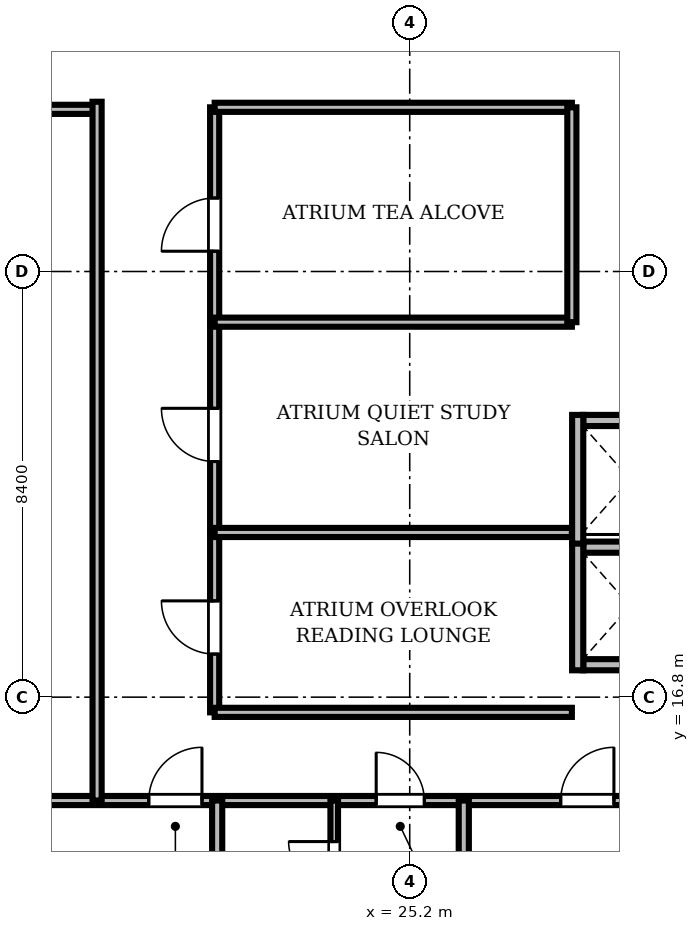
"""IFC4 building model, lengths in metres.
Left out: names, types, materials, properties, quantities, classifications, styles, units other than length and angle.
Written with IfcOpenShell. Run it as: python <this file> out.ifc"""

import sys

from ifc_helpers import new_model, si_unit, direction, frame, frame_2d, origin, place, context, subcontext, project, spatial, rectangle, extrude, source, transform, mapped, element, fill, save


model = new_model("IFC4")
c1 = context("Model", 3, precision=1e-05, world=origin(), true_north=direction((0.0, 1.0)))
c2 = subcontext(c1, "Body", "Model", "MODEL_VIEW")
j1 = project(units=[si_unit("LENGTHUNIT", "METRE"), si_unit("PLANEANGLEUNIT", "RADIAN")], contexts=[c1])
p1 = place(None, origin())
s1 = spatial("IfcSite", under=j1, at=p1, CompositionType="ELEMENT")
p2 = place(p1, origin())
s2 = spatial("IfcBuilding", under=s1, at=p2, CompositionType="ELEMENT")
p3 = place(p2, frame((0.0, 0.0, 45.85)))
s3 = spatial("IfcBuildingStorey", under=s2, at=p3, CompositionType="ELEMENT", Elevation=45.85)
m1 = source(origin(), c2, "Body", "SweptSolid", [
    extrude(rectangle(XDim=1.85, YDim=0.22, at=frame_2d((0.925, 0.0))), origin(), (0.0, 0.0, 1.0), 3.41),
])
for number, where, z_axis, x_axis in (
    (1, (28.625, 17.44, 0.0), (0.0, 0.0, 1.0), (1.0, 0.0, 0.0)),
    (2, (28.625, 19.76, 0.0), (0.0, 0.0, 1.0), (1.0, 0.0, 0.0)),
):
    element("IfcWall", number, at=place(p3, frame(where, z_axis=z_axis, x_axis=x_axis)), inside=s3, PredefinedType="SOLIDWALL", context=c2, shape_type="MappedRepresentation", body=[
        mapped(m1, transform((0.0, 0.0, 0.0), scale=1.0)),
    ])
m2 = source(origin(), c2, "Body", "SweptSolid", [
    extrude(rectangle(XDim=2.54, YDim=0.22, at=frame_2d((1.27, 0.0))), origin(), (0.0, 0.0, 1.0), 3.41),
])
p4 = place(p3, frame((28.515, 17.33, 0.0), z_axis=(0.0, 0.0, 1.0), x_axis=(0.0, 1.0, 0.0)))
e3 = element("IfcWall", 3, at=p4, inside=s3, PredefinedType="SOLIDWALL", context=c2, shape_type="MappedRepresentation", body=[
    mapped(m2, transform((0.0, 0.0, 0.0), scale=1.0)),
])
p5 = place(p3, frame((28.625, 22.26, 0.0), z_axis=(0.0, 0.0, 1.0), x_axis=(1.0, 0.0, 0.0)))
e4 = element("IfcWall", 4, at=p5, inside=s3, PredefinedType="SOLIDWALL", context=c2, shape_type="MappedRepresentation", body=[
    mapped(m1, transform((0.0, 0.0, 0.0), scale=1.0)),
])
p6 = place(p3, frame((28.515, 19.83, 0.0), z_axis=(0.0, 0.0, 1.0), x_axis=(0.0, 1.0, 0.0)))
e5 = element("IfcWall", 5, at=p6, inside=s3, PredefinedType="SOLIDWALL", context=c2, shape_type="MappedRepresentation", body=[
    mapped(m2, transform((0.0, 0.0, 0.0), scale=1.0)),
])
m3 = source(origin(), c2, "Body", "SweptSolid", [
    extrude(rectangle(XDim=46.156, YDim=0.18, at=frame_2d((23.078, 0.0))), origin(), (0.0, 0.0, 1.0), 2.652),
])
p7 = place(p3, frame((2.422, 14.76, 0.0), z_axis=(0.0, 0.0, 1.0), x_axis=(1.0, 0.0, 0.0)))
e6 = element("IfcWall", 6, at=p7, inside=s3, PredefinedType="PARTITIONING", context=c2, shape_type="MappedRepresentation", body=[
    mapped(m3, transform((0.0, 0.0, 0.0), scale=1.0)),
])
m4 = source(origin(), c2, "Body", "SweptSolid", [
    extrude(rectangle(XDim=1.05, YDim=2.2, at=frame_2d((0.525, 1.1))), frame((0.0, 0.1, 0.0), z_axis=(0.0, -1.0, 0.0), x_axis=(1.0, 0.0, 0.0)), (0.0, 0.0, 1.0), 0.2),
])
p8 = place(p7, frame((17.628, 0.0, 0.0)))
e7 = element("IfcOpeningElement", 7, at=p8, cuts=e6, PredefinedType="OPENING", context=c2, shape_type="MappedRepresentation", body=[
    mapped(m4, transform((0.0, 0.0, 0.0), scale=1.0)),
])
m5 = source(origin(), c2, "Body", "SweptSolid", [
    extrude(rectangle(XDim=0.95, YDim=2.15, at=frame_2d((0.475, 1.075))), frame((0.0, 0.1, 0.0), z_axis=(0.0, -1.0, 0.0), x_axis=(1.0, 0.0, 0.0)), (0.0, 0.0, 1.0), 0.2),
])
p9 = place(p7, frame((22.116, 0.0, 0.0)))
e8 = element("IfcOpeningElement", 8, at=p9, cuts=e6, PredefinedType="OPENING", context=c2, shape_type="MappedRepresentation", body=[
    mapped(m5, transform((0.0, 0.0, 0.0), scale=1.0)),
])
p10 = place(p7, frame((25.758, 0.0, 0.0)))
e9 = element("IfcOpeningElement", 9, at=p10, cuts=e6, PredefinedType="OPENING", context=c2, shape_type="MappedRepresentation", body=[
    mapped(m4, transform((0.0, 0.0, 0.0), scale=1.0)),
])
p11 = place(p7, frame((30.625, 0.0, 0.0)))
e10 = element("IfcOpeningElement", 10, at=p11, cuts=e6, PredefinedType="OPENING", context=c2, shape_type="MappedRepresentation", body=[
    mapped(m4, transform((0.0, 0.0, 0.0), scale=1.0)),
])
p12 = place(p7, frame((36.716, 0.0, 0.0)))
e11 = element("IfcOpeningElement", 11, at=p12, cuts=e6, PredefinedType="OPENING", context=c2, shape_type="MappedRepresentation", body=[
    mapped(m5, transform((0.0, 0.0, 0.0), scale=1.0)),
])
p13 = place(p7, frame((41.766, 0.0, 0.0)))
e12 = element("IfcOpeningElement", 12, at=p13, cuts=e6, PredefinedType="OPENING", context=c2, shape_type="MappedRepresentation", body=[
    mapped(m4, transform((0.0, 0.0, 0.0), scale=1.0)),
])
m6 = source(origin(), c2, "Body", "SweptSolid", [
    extrude(rectangle(XDim=4.24, YDim=0.18, at=frame_2d((2.12, 0.0))), origin(), (0.0, 0.0, 1.0), 2.802),
])
p14 = place(p3, frame((21.35, 24.2, 0.0), z_axis=(0.0, 0.0, 1.0), x_axis=(0.0, 1.0, 0.0)))
e13 = element("IfcWall", 13, at=p14, inside=s3, PredefinedType="PARTITIONING", context=c2, shape_type="MappedRepresentation", body=[
    mapped(m6, transform((0.0, 0.0, 0.0), scale=1.0)),
])
p15 = place(p14, frame((1.4, 0.0, 0.0)))
e14 = element("IfcOpeningElement", 14, at=p15, cuts=e13, PredefinedType="OPENING", context=c2, shape_type="MappedRepresentation", body=[
    mapped(m4, transform((0.0, 0.0, 0.0), scale=1.0)),
])
m7 = source(origin(), c2, "Body", "SweptSolid", [
    extrude(rectangle(XDim=4.15, YDim=0.18, at=frame_2d((2.075, 0.0))), origin(), (0.0, 0.0, 1.0), 3.042),
])
p16 = place(p3, frame((21.35, 20.05, 0.0), z_axis=(0.0, 0.0, 1.0), x_axis=(0.0, 1.0, 0.0)))
e15 = element("IfcWall", 15, at=p16, inside=s3, PredefinedType="PARTITIONING", context=c2, shape_type="MappedRepresentation", body=[
    mapped(m7, transform((0.0, 0.0, 0.0), scale=1.0)),
])
p17 = place(p16, frame((1.4, 0.0, 0.0)))
e16 = element("IfcOpeningElement", 16, at=p17, cuts=e15, PredefinedType="OPENING", context=c2, shape_type="MappedRepresentation", body=[
    mapped(m4, transform((0.0, 0.0, 0.0), scale=1.0)),
])
m8 = source(origin(), c2, "Body", "SweptSolid", [
    extrude(rectangle(XDim=3.55, YDim=0.18, at=frame_2d((1.775, 0.0))), origin(), (0.0, 0.0, 1.0), 2.802),
])
p18 = place(p3, frame((21.35, 16.5, 0.0), z_axis=(0.0, 0.0, 1.0), x_axis=(0.0, 1.0, 0.0)))
e17 = element("IfcWall", 17, at=p18, inside=s3, PredefinedType="PARTITIONING", context=c2, shape_type="MappedRepresentation", body=[
    mapped(m8, transform((0.0, 0.0, 0.0), scale=1.0)),
])
p19 = place(p18, frame((1.15, 0.0, 0.0)))
e18 = element("IfcOpeningElement", 18, at=p19, cuts=e17, PredefinedType="OPENING", context=c2, shape_type="MappedRepresentation", body=[
    mapped(m4, transform((0.0, 0.0, 0.0), scale=1.0)),
])
m9 = source(origin(), c2, "Body", "SweptSolid", [
    extrude(rectangle(XDim=2.36, YDim=0.15, at=frame_2d((1.18, 0.0))), origin(), (0.0, 0.0, 1.0), 3.41),
])
p20 = place(p3, frame((23.71, 12.4, 0.0), z_axis=(0.0, 0.0, 1.0), x_axis=(0.0, 1.0, 0.0)))
e19 = element("IfcWall", 19, at=p20, inside=s3, PredefinedType="PARTITIONING", context=c2, shape_type="MappedRepresentation", body=[
    mapped(m9, transform((0.0, 0.0, 0.0), scale=1.0)),
])
m10 = source(origin(), c2, "Body", "SweptSolid", [
    extrude(rectangle(XDim=0.9, YDim=2.1, at=frame_2d((0.45, 1.05))), frame((0.0, 0.085, 0.0), z_axis=(0.0, -1.0, 0.0), x_axis=(1.0, 0.0, 0.0)), (0.0, 0.0, 1.0), 0.17),
])
p21 = place(p20, frame((0.65, 0.0, 0.0)))
e20 = element("IfcOpeningElement", 20, at=p21, cuts=e19, PredefinedType="OPENING", context=c2, shape_type="MappedRepresentation", body=[
    mapped(m10, transform((0.0, 0.0, 0.0), scale=1.0)),
])
m11 = source(origin(), c2, "Body", "SweptSolid", [
    extrude(rectangle(XDim=16.8, YDim=0.18, at=frame_2d((8.4, 0.0))), origin(), (0.0, 0.0, 1.0), 2.652),
])
p22 = place(p3, frame((2.23, 28.4, 0.0), z_axis=(0.0, 0.0, 1.0), x_axis=(1.0, 0.0, 0.0)))
e21 = element("IfcWall", 21, at=p22, inside=s3, PredefinedType="PARTITIONING", context=c2, shape_type="MappedRepresentation", body=[
    mapped(m11, transform((0.0, 0.0, 0.0), scale=1.0)),
])
m12 = source(origin(), c2, "Body", "SweptSolid", [
    extrude(rectangle(XDim=13.79, YDim=0.18, at=frame_2d((6.895, 0.0))), origin(), (0.0, 0.0, 1.0), 2.802),
])
p23 = place(p3, frame((19.03, 14.76, 0.0), z_axis=(0.0, 0.0, 1.0), x_axis=(0.0, 1.0, 0.0)))
e22 = element("IfcWall", 22, at=p23, inside=s3, PredefinedType="PARTITIONING", context=c2, shape_type="MappedRepresentation", body=[
    mapped(m12, transform((0.0, 0.0, 0.0), scale=1.0)),
])
m13 = source(origin(), c2, "Body", "SweptSolid", [
    extrude(rectangle(XDim=12.638, YDim=0.2, at=frame_2d((6.319, 0.0))), origin(), (0.0, 0.0, 1.0), 2.652),
])
p24 = place(p3, frame((21.4, 2.122, 0.0), z_axis=(0.0, 0.0, 1.0), x_axis=(0.0, 1.0, 0.0)))
e23 = element("IfcWall", 23, at=p24, inside=s3, PredefinedType="PARTITIONING", context=c2, shape_type="MappedRepresentation", body=[
    mapped(m13, transform((0.0, 0.0, 0.0), scale=1.0)),
])
m14 = source(origin(), c2, "Body", "SweptSolid", [
    extrude(rectangle(XDim=12.83, YDim=0.2, at=frame_2d((6.415, 0.0))), origin(), (0.0, 0.0, 1.0), 2.652),
])
p25 = place(p3, frame((26.267, 1.93, 0.0), z_axis=(0.0, 0.0, 1.0), x_axis=(0.0, 1.0, 0.0)))
e24 = element("IfcWall", 24, at=p25, inside=s3, PredefinedType="PARTITIONING", context=c2, shape_type="MappedRepresentation", body=[
    mapped(m14, transform((0.0, 0.0, 0.0), scale=1.0)),
])
m15 = source(origin(), c2, "Body", "SweptSolid", [
    extrude(rectangle(XDim=7.05, YDim=0.18, at=frame_2d((3.525, 0.0))), origin(), (0.0, 0.0, 1.0), 2.802),
])
p26 = place(p3, frame((21.35, 16.5, 0.0), z_axis=(0.0, 0.0, 1.0), x_axis=(1.0, 0.0, 0.0)))
e25 = element("IfcWall", 25, at=p26, inside=s3, PredefinedType="PARTITIONING", context=c2, shape_type="MappedRepresentation", body=[
    mapped(m15, transform((0.0, 0.0, 0.0), scale=1.0)),
])
m16 = source(origin(), c2, "Body", "SweptSolid", [
    extrude(rectangle(XDim=7.05, YDim=0.18, at=frame_2d((3.525, 0.0))), origin(), (0.0, 0.0, 1.0), 3.41),
])
for number, where, z_axis, x_axis in (
    (26, (21.35, 20.05, 0.0), (0.0, 0.0, 1.0), (1.0, 0.0, 0.0)),
    (27, (21.35, 24.2, 0.0), (0.0, 0.0, 1.0), (1.0, 0.0, 0.0)),
    (28, (21.35, 28.44, 0.0), (0.0, 0.0, 1.0), (1.0, 0.0, 0.0)),
):
    element("IfcWall", number, at=place(p3, frame(where, z_axis=z_axis, x_axis=x_axis)), inside=s3, PredefinedType="PARTITIONING", context=c2, shape_type="MappedRepresentation", body=[
        mapped(m16, transform((0.0, 0.0, 0.0), scale=1.0)),
    ])
p27 = place(p3, frame((28.4, 24.2, 0.0), z_axis=(0.0, 0.0, 1.0), x_axis=(0.0, 1.0, 0.0)))
e29 = element("IfcWall", 29, at=p27, inside=s3, PredefinedType="PARTITIONING", context=c2, shape_type="MappedRepresentation", body=[
    mapped(m6, transform((0.0, 0.0, 0.0), scale=1.0)),
])
m17 = source(origin(), c2, "Body", "SweptSolid", [
    extrude(rectangle(XDim=1.05, YDim=2.2, at=frame_2d((0.525, 1.1))), frame((0.0, 0.025, 0.0), z_axis=(0.0, -1.0, 0.0), x_axis=(1.0, 0.0, 0.0)), (0.0, 0.0, 1.0), 0.05),
])
p28 = place(p8, origin())
e30 = element("IfcDoor", 30, at=p28, inside=s3, OperationType="SINGLE_SWING_RIGHT", PredefinedType="DOOR", context=c2, shape_type="MappedRepresentation", body=[
    mapped(m17, transform((0.0, 0.0, 0.0), scale=1.0)),
])
fill(e7, e30)
m18 = source(origin(), c2, "Body", "SweptSolid", [
    extrude(rectangle(XDim=0.95, YDim=2.15, at=frame_2d((0.475, 1.075))), frame((0.0, 0.025, 0.0), z_axis=(0.0, -1.0, 0.0), x_axis=(1.0, 0.0, 0.0)), (0.0, 0.0, 1.0), 0.05),
])
p29 = place(p9, origin())
e31 = element("IfcDoor", 31, at=p29, inside=s3, OperationType="SINGLE_SWING_LEFT", PredefinedType="DOOR", context=c2, shape_type="MappedRepresentation", body=[
    mapped(m18, transform((0.0, 0.0, 0.0), scale=1.0)),
])
fill(e8, e31)
p30 = place(p10, origin())
e32 = element("IfcDoor", 32, at=p30, inside=s3, OperationType="SINGLE_SWING_RIGHT", PredefinedType="DOOR", context=c2, shape_type="MappedRepresentation", body=[
    mapped(m17, transform((0.0, 0.0, 0.0), scale=1.0)),
])
fill(e9, e32)
p31 = place(p15, origin())
e33 = element("IfcDoor", 33, at=p31, inside=s3, OperationType="SINGLE_SWING_LEFT", PredefinedType="DOOR", context=c2, shape_type="MappedRepresentation", body=[
    mapped(m17, transform((0.0, 0.0, 0.0), scale=1.0)),
])
fill(e14, e33)
p32 = place(p17, origin())
e34 = element("IfcDoor", 34, at=p32, inside=s3, OperationType="SINGLE_SWING_RIGHT", PredefinedType="DOOR", context=c2, shape_type="MappedRepresentation", body=[
    mapped(m17, transform((0.0, 0.0, 0.0), scale=1.0)),
])
fill(e16, e34)
p33 = place(p19, origin())
e35 = element("IfcDoor", 35, at=p33, inside=s3, OperationType="SINGLE_SWING_RIGHT", PredefinedType="DOOR", context=c2, shape_type="MappedRepresentation", body=[
    mapped(m17, transform((0.0, 0.0, 0.0), scale=1.0)),
])
fill(e18, e35)
m19 = source(origin(), c2, "Body", "SweptSolid", [
    extrude(rectangle(XDim=0.9, YDim=2.1, at=frame_2d((0.45, 1.05))), frame((0.0, 0.025, 0.0), z_axis=(0.0, -1.0, 0.0), x_axis=(1.0, 0.0, 0.0)), (0.0, 0.0, 1.0), 0.05),
])
p34 = place(p21, origin())
e36 = element("IfcDoor", 36, at=p34, inside=s3, OperationType="SINGLE_SWING_RIGHT", PredefinedType="DOOR", context=c2, shape_type="MappedRepresentation", body=[
    mapped(m19, transform((0.0, 0.0, 0.0), scale=1.0)),
])
fill(e20, e36)
save(model, sys.argv[1])
